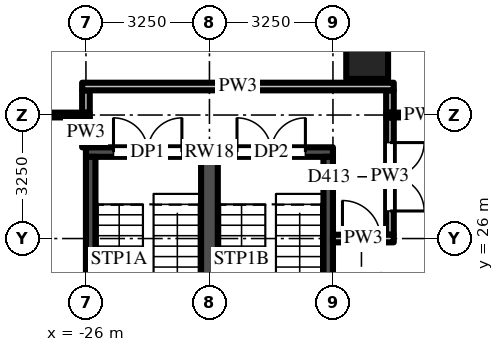
"""IFC4 building model, lengths in metres.
Left out: names, types, materials, properties, quantities, classifications, styles, units other than length and angle.
Written with IfcOpenShell. Run it as: python <this file> out.ifc"""

import sys

from ifc_helpers import new_model, si_unit, direction, frame, frame_2d, origin, origin_2d, place, context, subcontext, project, spatial, rectangle, extrude, source, transform, mapped, element, fill, save


model = new_model("IFC4")
c1 = context("Model", 3, precision=1e-05, world=origin(), true_north=direction((0.0, 1.0)))
c2 = subcontext(c1, "Body", "Model", "MODEL_VIEW")
j1 = project(units=[si_unit("LENGTHUNIT", "METRE"), si_unit("PLANEANGLEUNIT", "RADIAN")], contexts=[c1])
p1 = place(None, origin())
s1 = spatial("IfcSite", under=j1, at=p1, CompositionType="ELEMENT")
p2 = place(p1, origin())
s2 = spatial("IfcBuilding", under=s1, at=p2, CompositionType="ELEMENT")
p3 = place(p2, frame((0.0, 0.0, 14.0)))
s3 = spatial("IfcBuildingStorey", under=s2, at=p3, CompositionType="ELEMENT", Elevation=14.0)
m1 = source(origin(), c2, "Body", "SweptSolid", [
    extrude(rectangle(XDim=1.1, YDim=1.1, at=origin_2d()), origin(), (0.0, 0.0, 1.0), 5.0),
])
p4 = place(p3, frame((-18.6, 30.75, 0.0), z_axis=(0.0, 0.0, 1.0), x_axis=(1.0, 0.0, 0.0)))
e1 = element("IfcColumn", 1, at=p4, inside=s3, PredefinedType="COLUMN", context=c2, shape_type="MappedRepresentation", body=[
    mapped(m1, transform((0.0, 0.0, 0.0))),
])
m2 = source(origin(), c2, "Body", "SweptSolid", [
    extrude(rectangle(XDim=6.5, YDim=0.25, at=frame_2d((3.25, 0.0))), origin(), (0.0, 0.0, 1.0), 4.7),
])
p5 = place(p3, frame((-26.0, 28.275, 0.0), z_axis=(0.0, 0.0, 1.0), x_axis=(1.0, 0.0, 0.0)))
e2 = element("IfcWall", 2, at=p5, inside=s3, PredefinedType="SHEAR", context=c2, shape_type="MappedRepresentation", body=[
    mapped(m2, transform((0.0, 0.0, 0.0))),
])
m3 = source(origin(), c2, "Body", "SweptSolid", [
    extrude(rectangle(XDim=1.8, YDim=2.1, at=frame_2d((0.9, 1.05))), frame((0.0, 0.135, 0.0), z_axis=(0.0, -1.0, 0.0), x_axis=(1.0, 0.0, 0.0)), (0.0, 0.0, 1.0), 0.27),
])
p6 = place(p5, frame((0.725, 0.0, 0.0)))
e3 = element("IfcOpeningElement", 3, at=p6, cuts=e2, PredefinedType="OPENING", context=c2, shape_type="MappedRepresentation", body=[
    mapped(m3, transform((0.0, 0.0, 0.0))),
])
p7 = place(p5, frame((3.975, 0.0, 0.0)))
e4 = element("IfcOpeningElement", 4, at=p7, cuts=e2, PredefinedType="OPENING", context=c2, shape_type="MappedRepresentation", body=[
    mapped(m3, transform((0.0, 0.0, 0.0))),
])
m4 = source(origin(), c2, "Body", "SweptSolid", [
    extrude(rectangle(XDim=8.3, YDim=0.25, at=frame_2d((4.15, 0.0))), origin(), (0.0, 0.0, 1.0), 4.7),
])
for number, where, z_axis, x_axis in (
    (5, (-25.875, 19.85, 0.0), (0.0, 0.0, 1.0), (0.0, 1.0, 0.0)),
    (6, (-19.625, 19.85, 0.0), (0.0, 0.0, 1.0), (0.0, 1.0, 0.0)),
):
    element("IfcWall", number, at=place(p3, frame(where, z_axis=z_axis, x_axis=x_axis)), inside=s3, PredefinedType="SHEAR", context=c2, shape_type="MappedRepresentation", body=[
        mapped(m4, transform((0.0, 0.0, 0.0))),
    ])
m5 = source(origin(), c2, "Body", "SweptSolid", [
    extrude(rectangle(XDim=8.3, YDim=0.44, at=frame_2d((4.15, 0.0))), origin(), (0.0, 0.0, 1.0), 4.7),
])
p8 = place(p3, frame((-22.75, 19.85, 0.0), z_axis=(0.0, 0.0, 1.0), x_axis=(0.0, 1.0, 0.0)))
e7 = element("IfcWall", 7, at=p8, inside=s3, PredefinedType="SHEAR", context=c2, shape_type="MappedRepresentation", body=[
    mapped(m5, transform((0.0, 0.0, 0.0))),
])
m6 = source(origin(), c2, "Body", "SweptSolid", [
    extrude(rectangle(XDim=0.788, YDim=0.2, at=frame_2d((0.394, 0.0))), origin(), (0.0, 0.0, 1.0), 4.7),
])
p9 = place(p3, frame((-26.0, 28.4, 0.0), z_axis=(0.0, 0.0, 1.0), x_axis=(0.0, 1.0, 0.0)))
e8 = element("IfcWall", 8, at=p9, inside=s3, PredefinedType="PARTITIONING", context=c2, shape_type="MappedRepresentation", body=[
    mapped(m6, transform((0.0, 0.0, 0.0))),
])
m7 = source(origin(), c2, "Body", "SweptSolid", [
    extrude(rectangle(XDim=0.587, YDim=0.2, at=frame_2d((0.294, 0.0))), origin(), (0.0, 0.0, 1.0), 4.7),
])
p10 = place(p3, frame((-26.0, 29.312, 0.0), z_axis=(0.0, 0.0, 1.0), x_axis=(0.0, 1.0, 0.0)))
e9 = element("IfcWall", 9, at=p10, inside=s3, PredefinedType="PARTITIONING", context=c2, shape_type="MappedRepresentation", body=[
    mapped(m7, transform((0.0, 0.0, 0.0))),
])
m8 = source(origin(), c2, "Body", "SweptSolid", [
    extrude(rectangle(XDim=3.087, YDim=0.2, at=frame_2d((1.544, 0.0))), origin(), (0.0, 0.0, 1.0), 4.274),
])
p11 = place(p3, frame((-18.0, 29.188, 0.0), z_axis=(0.0, 0.0, 1.0), x_axis=(0.0, -1.0, 0.0)))
e10 = element("IfcWall", 10, at=p11, inside=s3, PredefinedType="PARTITIONING", context=c2, shape_type="MappedRepresentation", body=[
    mapped(m8, transform((0.0, 0.0, 0.0))),
])
m9 = source(origin(), c2, "Body", "SweptSolid", [
    extrude(rectangle(XDim=1.8, YDim=2.1, at=frame_2d((0.9, 1.05))), frame((0.0, 0.11, 0.0), z_axis=(0.0, -1.0, 0.0), x_axis=(1.0, 0.0, 0.0)), (0.0, 0.0, 1.0), 0.22),
])
p12 = place(p11, frame((0.663, 0.0, 0.0)))
e11 = element("IfcOpeningElement", 11, at=p12, cuts=e10, PredefinedType="OPENING", context=c2, shape_type="MappedRepresentation", body=[
    mapped(m9, transform((0.0, 0.0, 0.0))),
])
p13 = place(p3, frame((-18.0, 29.312, 0.0), z_axis=(0.0, 0.0, 1.0), x_axis=(0.0, 1.0, 0.0)))
e12 = element("IfcWall", 12, at=p13, inside=s3, PredefinedType="PARTITIONING", context=c2, shape_type="MappedRepresentation", body=[
    mapped(m7, transform((0.0, 0.0, 0.0))),
])
m10 = source(origin(), c2, "Body", "SweptSolid", [
    extrude(rectangle(XDim=1.6, YDim=0.2, at=frame_2d((0.8, 0.0))), origin(), (0.0, 0.0, 1.0), 3.762),
])
p14 = place(p3, frame((-19.5, 26.0, 0.0), z_axis=(0.0, 0.0, 1.0), x_axis=(1.0, 0.0, 0.0)))
e13 = element("IfcWall", 13, at=p14, inside=s3, PredefinedType="PARTITIONING", context=c2, shape_type="MappedRepresentation", body=[
    mapped(m10, transform((0.0, 0.0, 0.0))),
])
m11 = source(origin(), c2, "Body", "SweptSolid", [
    extrude(rectangle(XDim=1.0, YDim=2.1, at=frame_2d((0.5, 1.05))), frame((0.0, 0.11, 0.0), z_axis=(0.0, -1.0, 0.0), x_axis=(1.0, 0.0, 0.0)), (0.0, 0.0, 1.0), 0.22),
])
p15 = place(p14, frame((0.25, 0.0, 0.0)))
e14 = element("IfcOpeningElement", 14, at=p15, cuts=e13, PredefinedType="OPENING", context=c2, shape_type="MappedRepresentation", body=[
    mapped(m11, transform((0.0, 0.0, 0.0))),
])
m12 = source(origin(), c2, "Body", "SweptSolid", [
    extrude(rectangle(XDim=3.413, YDim=0.125, at=frame_2d((1.706, 0.0))), origin(), (0.0, 0.0, 1.0), 4.7),
])
p16 = place(p3, frame((-29.312, 29.25, 0.0), z_axis=(0.0, 0.0, 1.0), x_axis=(1.0, 0.0, 0.0)))
e15 = element("IfcWall", 15, at=p16, inside=s3, PredefinedType="PARTITIONING", context=c2, shape_type="MappedRepresentation", body=[
    mapped(m12, transform((0.0, 0.0, 0.0))),
])
m13 = source(origin(), c2, "Body", "SweptSolid", [
    extrude(rectangle(XDim=1.0, YDim=2.1, at=frame_2d((0.5, 1.05))), frame((0.0, 0.073, 0.0), z_axis=(0.0, -1.0, 0.0), x_axis=(1.0, 0.0, 0.0)), (0.0, 0.0, 1.0), 0.145),
])
p17 = place(p16, frame((0.413, 0.0, 0.0)))
e16 = element("IfcOpeningElement", 16, at=p17, cuts=e15, PredefinedType="OPENING", context=c2, shape_type="MappedRepresentation", body=[
    mapped(m13, transform((0.0, 0.0, 0.0))),
])
m14 = source(origin(), c2, "Body", "SweptSolid", [
    extrude(rectangle(XDim=1.95, YDim=0.125, at=frame_2d((0.975, 0.0))), origin(), (0.0, 0.0, 1.0), 4.7),
])
p18 = place(p3, frame((-18.1, 29.25, 0.0), z_axis=(0.0, 0.0, 1.0), x_axis=(1.0, 0.0, 0.0)))
e17 = element("IfcWall", 17, at=p18, inside=s3, PredefinedType="PARTITIONING", context=c2, shape_type="MappedRepresentation", body=[
    mapped(m14, transform((0.0, 0.0, 0.0))),
])
m15 = source(origin(), c2, "Body", "SweptSolid", [
    extrude(rectangle(XDim=8.2, YDim=0.2, at=frame_2d((4.1, 0.0))), origin(), (0.0, 0.0, 1.0), 3.762),
])
p19 = place(p3, frame((-26.1, 30.0, 0.0), z_axis=(0.0, 0.0, 1.0), x_axis=(1.0, 0.0, 0.0)))
e18 = element("IfcWall", 18, at=p19, inside=s3, PredefinedType="PARTITIONING", context=c2, shape_type="MappedRepresentation", body=[
    mapped(m15, transform((0.0, 0.0, 0.0))),
])
m16 = source(origin(), c2, "Body", "SweptSolid", [
    extrude(rectangle(XDim=1.8, YDim=2.1, at=frame_2d((0.9, 1.05))), frame((0.0, 0.025, 0.0), z_axis=(0.0, -1.0, 0.0), x_axis=(1.0, 0.0, 0.0)), (0.0, 0.0, 1.0), 0.05),
])
p20 = place(p6, origin())
e19 = element("IfcDoor", 19, at=p20, inside=s3, OperationType="DOUBLE_DOOR_SINGLE_SWING", PredefinedType="DOOR", context=c2, shape_type="MappedRepresentation", body=[
    mapped(m16, transform((0.0, 0.0, 0.0))),
])
fill(e3, e19)
p21 = place(p7, origin())
e20 = element("IfcDoor", 20, at=p21, inside=s3, OperationType="DOUBLE_DOOR_SINGLE_SWING", PredefinedType="DOOR", context=c2, shape_type="MappedRepresentation", body=[
    mapped(m16, transform((0.0, 0.0, 0.0))),
])
fill(e4, e20)
m17 = source(origin(), c2, "Body", "SweptSolid", [
    extrude(rectangle(XDim=1.0, YDim=2.1, at=frame_2d((0.5, 1.05))), frame((0.0, 0.025, 0.0), z_axis=(0.0, -1.0, 0.0), x_axis=(1.0, 0.0, 0.0)), (0.0, 0.0, 1.0), 0.05),
])
p22 = place(p15, origin())
e21 = element("IfcDoor", 21, at=p22, inside=s3, OperationType="SINGLE_SWING_LEFT", PredefinedType="DOOR", context=c2, shape_type="MappedRepresentation", body=[
    mapped(m17, transform((0.0, 0.0, 0.0))),
])
fill(e14, e21)
p23 = place(p12, origin())
e22 = element("IfcDoor", 22, at=p23, inside=s3, OperationType="DOUBLE_DOOR_SINGLE_SWING", PredefinedType="DOOR", context=c2, shape_type="MappedRepresentation", body=[
    mapped(m16, transform((0.0, 0.0, 0.0))),
])
fill(e11, e22)
save(model, sys.argv[1])
